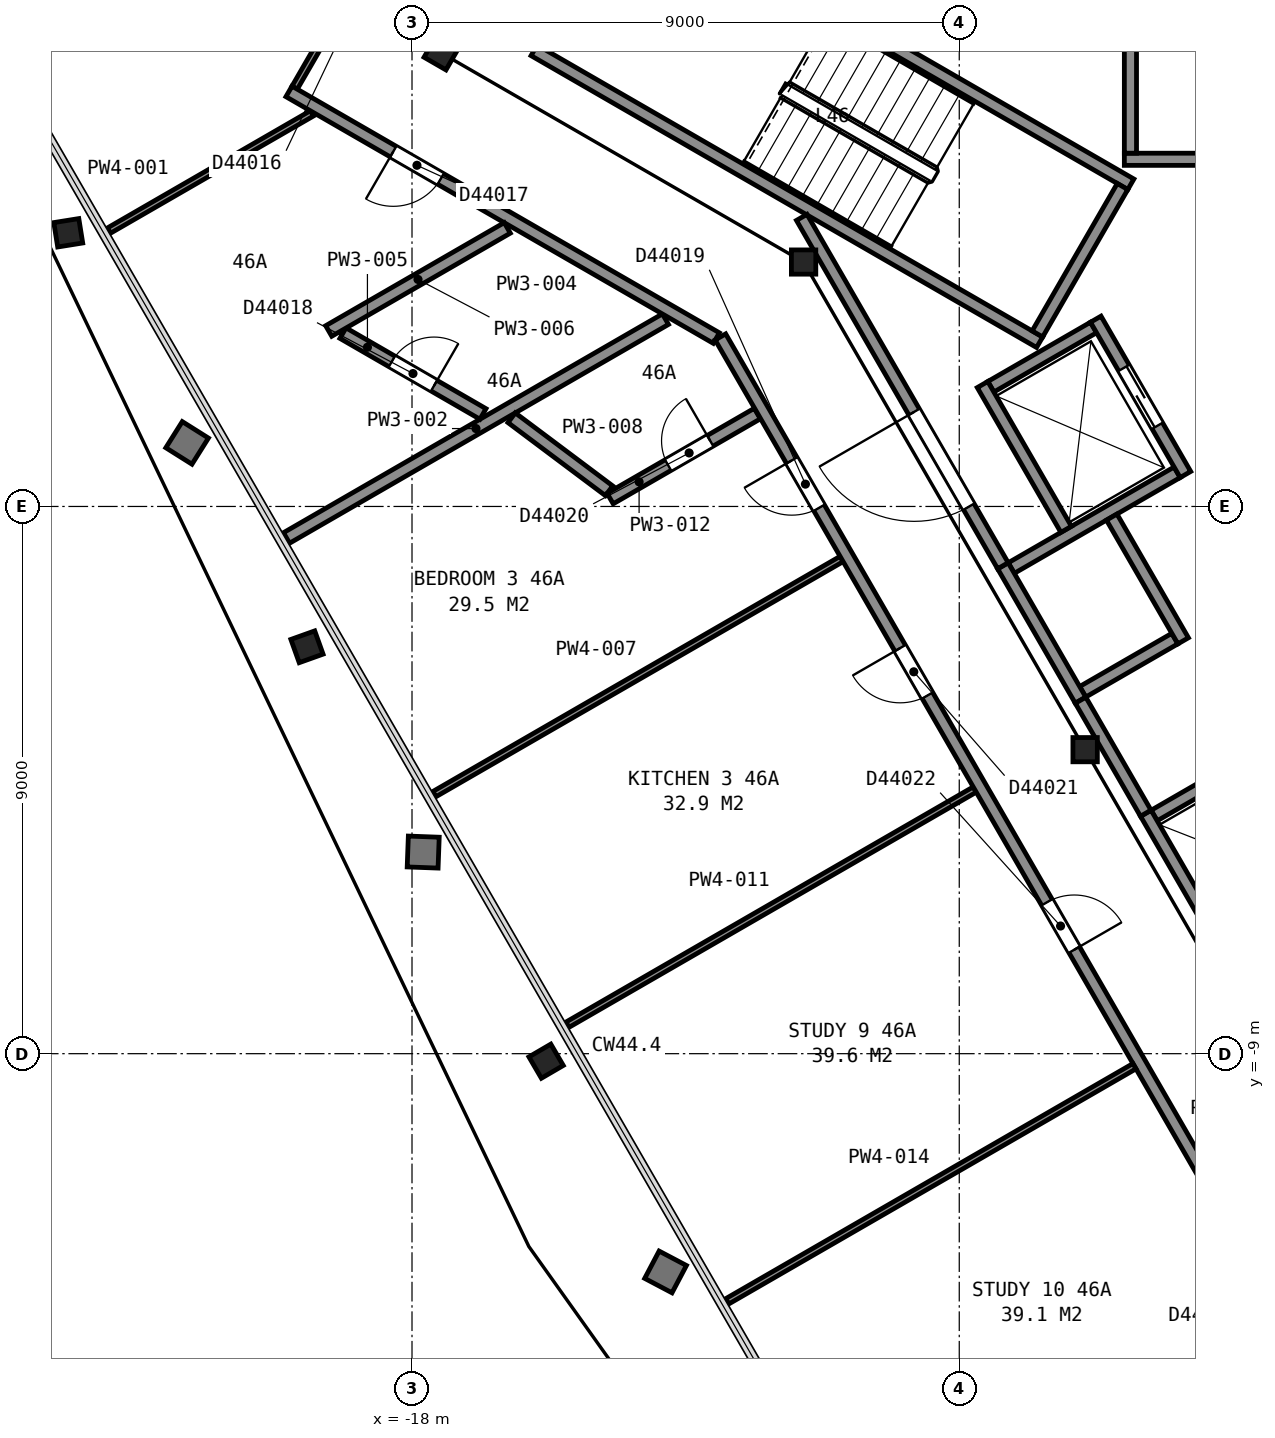
"""IFC4 building model, lengths in metres.
Left out: names, types, materials, properties, quantities, classifications, styles, units other than length and angle.
Written with IfcOpenShell. Run it as: python <this file> out.ifc"""

import sys

from ifc_helpers import new_model, si_unit, direction, frame, frame_2d, origin, origin_2d, place, context, subcontext, project, spatial, rectangle, i_section, extrude, element, fill, save


model = new_model("IFC4")
c1 = context("Model", 3, precision=1e-05, world=origin(), true_north=direction((0.0, 1.0)))
c2 = subcontext(c1, "Body", "Model", "MODEL_VIEW")
j1 = project(units=[si_unit("LENGTHUNIT", "METRE"), si_unit("PLANEANGLEUNIT", "RADIAN")], contexts=[c1])
p1 = place(None, origin())
s1 = spatial("IfcSite", under=j1, at=p1, CompositionType="ELEMENT")
p2 = place(p1, origin())
s2 = spatial("IfcBuilding", under=s1, at=p2, CompositionType="ELEMENT")
p3 = place(p2, frame((0.0, 0.0, 185.8)))
s3 = spatial("IfcBuildingStorey", under=s2, at=p3, CompositionType="ELEMENT", Elevation=185.8)
p4 = place(p3, frame((-23.418, 4.539, 0.04), z_axis=(-0.198532076657, -0.031778345714, 0.979579068418), x_axis=(-0.498721760227, 0.86367768571, -0.073057929632)))
e1 = element("IfcColumn", 1, at=p4, inside=s3, PredefinedType="COLUMN", context=c2, shape_type="SweptSolid", body=[
    extrude(i_section(OverallWidth=0.406, OverallDepth=0.417, WebThickness=0.03, FlangeThickness=0.048, FilletRadius=0.015, at=origin_2d()), origin(), (0.0, 0.0, 1.0), 3.695),
])
p5 = place(p3, frame((-19.516, -2.232, 0.035), z_axis=(-0.177790178515, -0.063666319498, 0.982006747525), x_axis=(-0.499620629348, 0.865563464331, -0.034338257757)))
e2 = element("IfcColumn", 2, at=p5, inside=s3, PredefinedType="COLUMN", context=c2, shape_type="SweptSolid", body=[
    extrude(i_section(OverallWidth=0.406, OverallDepth=0.417, WebThickness=0.03, FlangeThickness=0.048, FilletRadius=0.015, at=origin_2d()), origin(), (0.0, 0.0, 1.0), 3.697),
])
p6 = place(p3, frame((-15.605, -9.013, 0.03), z_axis=(-0.159333785609, -0.093016123912, 0.982833020129), x_axis=(-0.500289595457, 0.865857733626, 0.000840117374)))
e3 = element("IfcColumn", 3, at=p6, inside=s3, PredefinedType="COLUMN", context=c2, shape_type="SweptSolid", body=[
    extrude(i_section(OverallWidth=0.406, OverallDepth=0.417, WebThickness=0.03, FlangeThickness=0.048, FilletRadius=0.015, at=origin_2d()), origin(), (0.0, 0.0, 1.0), 3.703),
])
p7 = place(p3, frame((-17.52, 7.46, 0.0), z_axis=(0.0, 0.0, 1.0), x_axis=(0.5, 0.866025403784, 0.0)))
e4 = element("IfcColumn", 4, at=p7, inside=s3, PredefinedType="COLUMN", context=c2, shape_type="SweptSolid", body=[
    extrude(i_section(OverallWidth=0.406, OverallDepth=0.417, WebThickness=0.03, FlangeThickness=0.048, FilletRadius=0.015, at=origin_2d()), origin(), (0.0, 0.0, 1.0), 3.7),
])
for number, where, z_axis, x_axis in (
    (5, (-11.56, 4.02, 0.0), (0.0, 0.0, 1.0), (1.0, 0.0, 0.0)),
    (6, (-6.93, -4.0, 0.0), (0.0, 0.0, 1.0), (1.0, 0.0, 0.0)),
):
    element("IfcColumn", number, at=place(p3, frame(where, z_axis=z_axis, x_axis=x_axis)), inside=s3, PredefinedType="COLUMN", context=c2, shape_type="SweptSolid", body=[
        extrude(i_section(OverallWidth=0.401, OverallDepth=0.399, WebThickness=0.025, FlangeThickness=0.04, FilletRadius=0.015, at=origin_2d()), origin(), (0.0, 0.0, 1.0), 3.7),
    ])
for number, where, z_axis, x_axis in (
    (7, (-7.678, 2.701, 0.0), (0.0, 0.0, 1.0), (-0.866, 0.5, 0.0)),
    (8, (-6.178, 5.299, 0.0), (0.0, 0.0, 1.0), (-0.866, 0.5, 0.0)),
):
    element("IfcWall", number, at=place(p3, frame(where, z_axis=z_axis, x_axis=x_axis)), inside=s3, PredefinedType="PARTITIONING", context=c2, shape_type="SweptSolid", body=[
        extrude(rectangle(XDim=9.6, YDim=0.2, at=frame_2d((4.8, 0.0))), origin(), (0.0, 0.0, 1.0), 3.45),
    ])
p8 = place(p3, frame((-6.315, 5.262, 0.0), z_axis=(0.0, 0.0, 1.0), x_axis=(-0.500049511043, -0.865996816683, 0.0)))
e9 = element("IfcWall", 9, at=p8, inside=s3, PredefinedType="PARTITIONING", context=c2, shape_type="SweptSolid", body=[
    extrude(rectangle(XDim=2.8, YDim=0.2, at=frame_2d((1.4, 0.0))), origin(), (0.0, 0.0, 1.0), 3.45),
])
p9 = place(p3, frame((-6.285, 5.71, 0.0), z_axis=(0.0, 0.0, 1.0), x_axis=(1.0, 0.0, 0.0)))
e10 = element("IfcWall", 10, at=p9, inside=s3, PredefinedType="PARTITIONING", context=c2, shape_type="SweptSolid", body=[
    extrude(rectangle(XDim=2.35, YDim=0.2, at=frame_2d((1.175, 0.0))), origin(), (0.0, 0.0, 1.0), 3.7),
])
for number, where, z_axis, x_axis in (
    (11, (-5.795, -5.083, 0.0), (0.0, 0.0, 1.0), (0.866, 0.5, 0.0)),
    (12, (-6.97, -3.048, 0.0), (0.0, 0.0, 1.0), (0.866, 0.5, 0.0)),
):
    element("IfcWall", number, at=place(p3, frame(where, z_axis=z_axis, x_axis=x_axis)), inside=s3, PredefinedType="PARTITIONING", context=c2, shape_type="SweptSolid", body=[
        extrude(rectangle(XDim=1.75, YDim=0.2, at=frame_2d((0.875, 0.0))), origin(), (0.0, 0.0, 1.0), 3.7),
    ])
p10 = place(p3, frame((-8.145, -1.013, 0.0), z_axis=(0.0, 0.0, 1.0), x_axis=(0.866016494683, 0.500015430699, 0.0)))
e13 = element("IfcWall", 13, at=p10, inside=s3, PredefinedType="PARTITIONING", context=c2, shape_type="SweptSolid", body=[
    extrude(rectangle(XDim=3.15, YDim=0.2, at=frame_2d((1.575, 0.0))), origin(), (0.0, 0.0, 1.0), 3.7),
])
p11 = place(p3, frame((-8.48, 1.969, 0.0), z_axis=(0.0, 0.0, 1.0), x_axis=(0.866000020948, 0.500043961785, 0.0)))
e14 = element("IfcWall", 14, at=p11, inside=s3, PredefinedType="PARTITIONING", context=c2, shape_type="SweptSolid", body=[
    extrude(rectangle(XDim=1.95, YDim=0.2, at=frame_2d((0.975, 0.0))), origin(), (0.0, 0.0, 1.0), 3.7),
])
p12 = place(p3, frame((-6.185, 5.81, 0.0), z_axis=(0.0, 0.0, 1.0), x_axis=(0.0, 1.0, 0.0)))
e15 = element("IfcWall", 15, at=p12, inside=s3, PredefinedType="PARTITIONING", context=c2, shape_type="SweptSolid", body=[
    extrude(rectangle(XDim=1.75, YDim=0.2, at=frame_2d((0.875, 0.0))), origin(), (0.0, 0.0, 1.0), 3.7),
])
p13 = place(p3, frame((-5.28, 0.525, 0.0), z_axis=(0.0, 0.0, 1.0), x_axis=(-0.500037662692, 0.866003658127, 0.0)))
e16 = element("IfcWall", 16, at=p13, inside=s3, PredefinedType="PARTITIONING", context=c2, shape_type="SweptSolid", body=[
    extrude(rectangle(XDim=2.95, YDim=0.2, at=frame_2d((1.475, 0.0))), origin(), (0.0, 0.0, 1.0), 3.7),
])
p14 = place(p13, frame((0.925, 0.0, 0.0)))
e17 = element("IfcOpeningElement", 17, at=p14, cuts=e16, PredefinedType="OPENING", context=c2, shape_type="SweptSolid", body=[
    extrude(rectangle(XDim=1.1, YDim=2.1, at=frame_2d((0.55, 1.05))), frame((0.0, 0.11, 0.0), z_axis=(0.0, -1.0, 0.0), x_axis=(1.0, 0.0, 0.0)), (0.0, 0.0, 1.0), 0.22),
])
p15 = place(p3, frame((-5.318, -2.21, 0.0), z_axis=(0.0, 0.0, 1.0), x_axis=(-0.499938297808, 0.866061024631, 0.0)))
e18 = element("IfcWall", 18, at=p15, inside=s3, PredefinedType="PARTITIONING", context=c2, shape_type="SweptSolid", body=[
    extrude(rectangle(XDim=2.35, YDim=0.2, at=frame_2d((1.175, 0.0))), origin(), (0.0, 0.0, 1.0), 3.7),
])
p16 = place(p3, frame((-7.242, -0.376, 0.0), z_axis=(0.0, 0.0, 1.0), x_axis=(-0.499996545922, 0.866027397988, 0.0)))
e19 = element("IfcWall", 19, at=p16, inside=s3, PredefinedType="PARTITIONING", context=c2, shape_type="SweptSolid", body=[
    extrude(rectangle(XDim=2.75, YDim=0.2, at=frame_2d((1.375, 0.0))), origin(), (0.0, 0.0, 1.0), 3.7),
])
for number, where, z_axis, x_axis in (
    (20, (-4.656, -7.255, 0.0), (0.0, 0.0, 1.0), (-0.5, 0.866, 0.0)),
    (21, (-7.006, -3.185, 0.0), (0.0, 0.0, 1.0), (-0.5, 0.866, 0.0)),
):
    element("IfcWall", number, at=place(p3, frame(where, z_axis=z_axis, x_axis=x_axis)), inside=s3, PredefinedType="PARTITIONING", context=c2, shape_type="SweptSolid", body=[
        extrude(rectangle(XDim=2.55, YDim=0.2, at=frame_2d((1.275, 0.0))), origin(), (0.0, 0.0, 1.0), 3.7),
    ])
p17 = place(p3, frame((-11.591, 4.755, 0.0), z_axis=(0.0, 0.0, 1.0), x_axis=(0.500043977787, -0.866000011708, 0.0)))
e22 = element("IfcWall", 22, at=p17, inside=s3, PredefinedType="PARTITIONING", context=c2, shape_type="SweptSolid", body=[
    extrude(rectangle(XDim=6.617, YDim=0.2, at=frame_2d((3.308, 0.0))), origin(), (0.0, 0.0, 1.0), 3.45),
])
p18 = place(p17, frame((3.695, 0.0, 0.0)))
e23 = element("IfcOpeningElement", 23, at=p18, cuts=e22, PredefinedType="OPENING", context=c2, shape_type="SweptSolid", body=[
    extrude(rectangle(XDim=1.8, YDim=2.1, at=frame_2d((0.9, 1.05))), frame((0.0, 0.11, 0.0), z_axis=(0.0, -1.0, 0.0), x_axis=(1.0, 0.0, 0.0)), (0.0, 0.0, 1.0), 0.22),
])
p19 = place(p3, frame((-7.005, -3.187, 0.0), z_axis=(0.0, 0.0, 1.0), x_axis=(0.499689606989, -0.866204535123, 0.0)))
e24 = element("IfcWall", 24, at=p19, inside=s3, PredefinedType="PARTITIONING", context=c2, shape_type="SweptSolid", body=[
    extrude(rectangle(XDim=2.145, YDim=0.2, at=frame_2d((1.072, 0.0))), origin(), (0.0, 0.0, 1.0), 3.45),
])
p20 = place(p3, frame((-22.983, 4.538, 0.0), z_axis=(0.0, 0.0, 1.0), x_axis=(0.865988254995, 0.500064338071, 0.0)))
e25 = element("IfcWall", 25, at=p20, inside=s3, PredefinedType="PARTITIONING", context=c2, shape_type="SweptSolid", body=[
    extrude(rectangle(XDim=3.853, YDim=0.1, at=frame_2d((1.927, 0.0))), origin(), (0.0, 0.0, 1.0), 2.713),
])
p21 = place(p3, frame((-20.064, -0.518, 0.0), z_axis=(0.0, 0.0, 1.0), x_axis=(0.865994046034, 0.500054309285, 0.0)))
e26 = element("IfcWall", 26, at=p21, inside=s3, PredefinedType="PARTITIONING", context=c2, shape_type="SweptSolid", body=[
    extrude(rectangle(XDim=7.196, YDim=0.2, at=frame_2d((3.598, 0.0))), origin(), (0.0, 0.0, 1.0), 2.713),
])
p22 = place(p3, frame((-19.93, 6.888, 0.0), z_axis=(0.0, 0.0, 1.0), x_axis=(0.500413056211, 0.865786794294, 0.0)))
e27 = element("IfcWall", 27, at=p22, inside=s3, PredefinedType="PARTITIONING", context=c2, shape_type="SweptSolid", body=[
    extrude(rectangle(XDim=8.047, YDim=0.1, at=frame_2d((4.023, 0.0))), origin(), (0.0, 0.0, 1.0), 2.713),
])
p23 = place(p22, frame((3.4, 0.0, 0.0)))
e28 = element("IfcOpeningElement", 28, at=p23, cuts=e27, PredefinedType="OPENING", context=c2, shape_type="SweptSolid", body=[
    extrude(rectangle(XDim=1.2, YDim=2.1, at=frame_2d((0.6, 1.05))), frame((0.0, 0.06, 0.0), z_axis=(0.0, -1.0, 0.0), x_axis=(1.0, 0.0, 0.0)), (0.0, 0.0, 1.0), 0.12),
])
p24 = place(p3, frame((-12.995, 2.77, 0.0), z_axis=(0.0, 0.0, 1.0), x_axis=(-0.866100425926, 0.499870035319, 0.0)))
e29 = element("IfcWall", 29, at=p24, inside=s3, PredefinedType="PARTITIONING", context=c2, shape_type="SweptSolid", body=[
    extrude(rectangle(XDim=8.115, YDim=0.2, at=frame_2d((4.058, 0.0))), origin(), (0.0, 0.0, 1.0), 2.713),
])
p25 = place(p24, frame((5.235, 0.0, 0.0)))
e30 = element("IfcOpeningElement", 30, at=p25, cuts=e29, PredefinedType="OPENING", context=c2, shape_type="SweptSolid", body=[
    extrude(rectangle(XDim=0.9, YDim=2.1, at=frame_2d((0.45, 1.05))), frame((0.0, 0.11, 0.0), z_axis=(0.0, -1.0, 0.0), x_axis=(1.0, 0.0, 0.0)), (0.0, 0.0, 1.0), 0.22),
])
p26 = place(p3, frame((-19.136, 2.851, 0.0), z_axis=(0.0, 0.0, 1.0), x_axis=(0.866008217664, -0.500029766052, 0.0)))
e31 = element("IfcWall", 31, at=p26, inside=s3, PredefinedType="PARTITIONING", context=c2, shape_type="SweptSolid", body=[
    extrude(rectangle(XDim=2.659, YDim=0.2, at=frame_2d((1.33, 0.0))), origin(), (0.0, 0.0, 1.0), 2.713),
])
p27 = place(p26, frame((0.93, 0.0, 0.0)))
e32 = element("IfcOpeningElement", 32, at=p27, cuts=e31, PredefinedType="OPENING", context=c2, shape_type="SweptSolid", body=[
    extrude(rectangle(XDim=0.8, YDim=2.1, at=frame_2d((0.4, 1.05))), frame((0.0, 0.11, 0.0), z_axis=(0.0, -1.0, 0.0), x_axis=(1.0, 0.0, 0.0)), (0.0, 0.0, 1.0), 0.22),
])
p28 = place(p3, frame((-19.37, 2.886, 0.0), z_axis=(0.0, 0.0, 1.0), x_axis=(0.866036909293, 0.499980071345, 0.0)))
e33 = element("IfcWall", 33, at=p28, inside=s3, PredefinedType="PARTITIONING", context=c2, shape_type="SweptSolid", body=[
    extrude(rectangle(XDim=3.391, YDim=0.2, at=frame_2d((1.695, 0.0))), origin(), (0.0, 0.0, 1.0), 2.713),
])
p29 = place(p3, frame((-17.632, -4.731, 0.0), z_axis=(0.0, 0.0, 1.0), x_axis=(0.866002098189, 0.500040364304, 0.0)))
e34 = element("IfcWall", 34, at=p29, inside=s3, PredefinedType="PARTITIONING", context=c2, shape_type="SweptSolid", body=[
    extrude(rectangle(XDim=7.733, YDim=0.1, at=frame_2d((3.867, 0.0))), origin(), (0.0, 0.0, 1.0), 2.713),
])
p30 = place(p3, frame((-16.362, 1.459, 0.0), z_axis=(0.0, 0.0, 1.0), x_axis=(0.800219351666, -0.59970741968, 0.0)))
e35 = element("IfcWall", 35, at=p30, inside=s3, PredefinedType="PARTITIONING", context=c2, shape_type="SweptSolid", body=[
    extrude(rectangle(XDim=2.003, YDim=0.2, at=frame_2d((1.001, 0.0))), origin(), (0.0, 0.0, 1.0), 2.713),
])
p31 = place(p3, frame((-15.442, -8.523, 0.0), z_axis=(0.0, 0.0, 1.0), x_axis=(0.866007875589, 0.500030358497, 0.0)))
e36 = element("IfcWall", 36, at=p31, inside=s3, PredefinedType="PARTITIONING", context=c2, shape_type="SweptSolid", body=[
    extrude(rectangle(XDim=7.733, YDim=0.1, at=frame_2d((3.866, 0.0))), origin(), (0.0, 0.0, 1.0), 2.713),
])
p32 = place(p3, frame((-14.742, 0.13, 0.0), z_axis=(0.0, 0.0, 1.0), x_axis=(0.866003766563, 0.500037474894, 0.0)))
e37 = element("IfcWall", 37, at=p32, inside=s3, PredefinedType="PARTITIONING", context=c2, shape_type="SweptSolid", body=[
    extrude(rectangle(XDim=2.795, YDim=0.2, at=frame_2d((1.397, 0.0))), origin(), (0.0, 0.0, 1.0), 2.713),
])
p33 = place(p32, frame((1.1, 0.0, 0.0)))
e38 = element("IfcOpeningElement", 38, at=p33, cuts=e37, PredefinedType="OPENING", context=c2, shape_type="SweptSolid", body=[
    extrude(rectangle(XDim=0.8, YDim=2.1, at=frame_2d((0.4, 1.05))), frame((0.0, 0.11, 0.0), z_axis=(0.0, -1.0, 0.0), x_axis=(1.0, 0.0, 0.0)), (0.0, 0.0, 1.0), 0.22),
])
p34 = place(p3, frame((-4.075, -12.545, 0.0), z_axis=(0.0, 0.0, 1.0), x_axis=(-0.499997769292, 0.86602669168, 0.0)))
e39 = element("IfcWall", 39, at=p34, inside=s3, PredefinedType="PARTITIONING", context=c2, shape_type="SweptSolid", body=[
    extrude(rectangle(XDim=17.706, YDim=0.2, at=frame_2d((8.853, 0.0))), origin(), (0.0, 0.0, 1.0), 2.713),
])
p35 = place(p34, frame((14.46, 0.0, 0.0)))
e40 = element("IfcOpeningElement", 40, at=p35, cuts=e39, PredefinedType="OPENING", context=c2, shape_type="SweptSolid", body=[
    extrude(rectangle(XDim=0.9, YDim=2.1, at=frame_2d((0.45, 1.05))), frame((0.0, 0.11, 0.0), z_axis=(0.0, -1.0, 0.0), x_axis=(1.0, 0.0, 0.0)), (0.0, 0.0, 1.0), 0.22),
])
p36 = place(p34, frame((10.896, 0.0, 0.0)))
e41 = element("IfcOpeningElement", 41, at=p36, cuts=e39, PredefinedType="OPENING", context=c2, shape_type="SweptSolid", body=[
    extrude(rectangle(XDim=0.9, YDim=2.1, at=frame_2d((0.45, 1.05))), frame((0.0, 0.11, 0.0), z_axis=(0.0, -1.0, 0.0), x_axis=(1.0, 0.0, 0.0)), (0.0, 0.0, 1.0), 0.22),
])
p37 = place(p34, frame((6.068, 0.0, 0.0)))
e42 = element("IfcOpeningElement", 42, at=p37, cuts=e39, PredefinedType="OPENING", context=c2, shape_type="SweptSolid", body=[
    extrude(rectangle(XDim=0.9, YDim=2.1, at=frame_2d((0.45, 1.05))), frame((0.0, 0.11, 0.0), z_axis=(0.0, -1.0, 0.0), x_axis=(1.0, 0.0, 0.0)), (0.0, 0.0, 1.0), 0.22),
])
p38 = place(p3, frame((-12.815, -13.073, 0.0), z_axis=(0.0, 0.0, 1.0), x_axis=(0.866007875589, 0.500030358497, 0.0)))
e43 = element("IfcWall", 43, at=p38, inside=s3, PredefinedType="PARTITIONING", context=c2, shape_type="SweptSolid", body=[
    extrude(rectangle(XDim=7.733, YDim=0.1, at=frame_2d((3.866, 0.0))), origin(), (0.0, 0.0, 1.0), 2.713),
])
p39 = place(p14, origin())
e44 = element("IfcDoor", 44, at=p39, inside=s3, OperationType="SLIDING_TO_LEFT", PredefinedType="DOOR", context=c2, shape_type="SweptSolid", body=[
    extrude(rectangle(XDim=1.1, YDim=2.1, at=frame_2d((0.55, 1.05))), frame((0.0, 0.025, 0.0), z_axis=(0.0, -1.0, 0.0), x_axis=(1.0, 0.0, 0.0)), (0.0, 0.0, 1.0), 0.05),
])
fill(e17, e44)
p40 = place(p18, origin())
e45 = element("IfcDoor", 45, at=p40, inside=s3, OperationType="DOUBLE_DOOR_SINGLE_SWING", PredefinedType="DOOR", context=c2, shape_type="SweptSolid", body=[
    extrude(rectangle(XDim=1.8, YDim=2.1, at=frame_2d((0.9, 1.05))), frame((0.0, 0.025, 0.0), z_axis=(0.0, -1.0, 0.0), x_axis=(1.0, 0.0, 0.0)), (0.0, 0.0, 1.0), 0.05),
])
fill(e23, e45)
p41 = place(p25, origin())
e46 = element("IfcDoor", 46, at=p41, inside=s3, OperationType="SINGLE_SWING_RIGHT", PredefinedType="DOOR", context=c2, shape_type="SweptSolid", body=[
    extrude(rectangle(XDim=0.9, YDim=2.1, at=frame_2d((0.45, 1.05))), frame((0.0, 0.025, 0.0), z_axis=(0.0, -1.0, 0.0), x_axis=(1.0, 0.0, 0.0)), (0.0, 0.0, 1.0), 0.05),
])
fill(e30, e46)
p42 = place(p27, origin())
e47 = element("IfcDoor", 47, at=p42, inside=s3, OperationType="SINGLE_SWING_RIGHT", PredefinedType="DOOR", context=c2, shape_type="SweptSolid", body=[
    extrude(rectangle(XDim=0.8, YDim=2.1, at=frame_2d((0.4, 1.05))), frame((0.0, 0.025, 0.0), z_axis=(0.0, -1.0, 0.0), x_axis=(1.0, 0.0, 0.0)), (0.0, 0.0, 1.0), 0.05),
])
fill(e32, e47)
p43 = place(p33, origin())
e48 = element("IfcDoor", 48, at=p43, inside=s3, OperationType="SINGLE_SWING_RIGHT", PredefinedType="DOOR", context=c2, shape_type="SweptSolid", body=[
    extrude(rectangle(XDim=0.8, YDim=2.1, at=frame_2d((0.4, 1.05))), frame((0.0, 0.025, 0.0), z_axis=(0.0, -1.0, 0.0), x_axis=(1.0, 0.0, 0.0)), (0.0, 0.0, 1.0), 0.05),
])
fill(e38, e48)
p44 = place(p35, origin())
e49 = element("IfcDoor", 49, at=p44, inside=s3, OperationType="SINGLE_SWING_RIGHT", PredefinedType="DOOR", context=c2, shape_type="SweptSolid", body=[
    extrude(rectangle(XDim=0.9, YDim=2.1, at=frame_2d((0.45, 1.05))), frame((0.0, 0.025, 0.0), z_axis=(0.0, -1.0, 0.0), x_axis=(1.0, 0.0, 0.0)), (0.0, 0.0, 1.0), 0.05),
])
fill(e40, e49)
p45 = place(p36, origin())
e50 = element("IfcDoor", 50, at=p45, inside=s3, OperationType="SINGLE_SWING_RIGHT", PredefinedType="DOOR", context=c2, shape_type="SweptSolid", body=[
    extrude(rectangle(XDim=0.9, YDim=2.1, at=frame_2d((0.45, 1.05))), frame((0.0, 0.025, 0.0), z_axis=(0.0, -1.0, 0.0), x_axis=(1.0, 0.0, 0.0)), (0.0, 0.0, 1.0), 0.05),
])
fill(e41, e50)
p46 = place(p37, origin())
e51 = element("IfcDoor", 51, at=p46, inside=s3, OperationType="SINGLE_SWING_LEFT", PredefinedType="DOOR", context=c2, shape_type="SweptSolid", body=[
    extrude(rectangle(XDim=0.9, YDim=2.1, at=frame_2d((0.45, 1.05))), frame((0.0, 0.025, 0.0), z_axis=(0.0, -1.0, 0.0), x_axis=(1.0, 0.0, 0.0)), (0.0, 0.0, 1.0), 0.05),
])
fill(e42, e51)
save(model, sys.argv[1])
